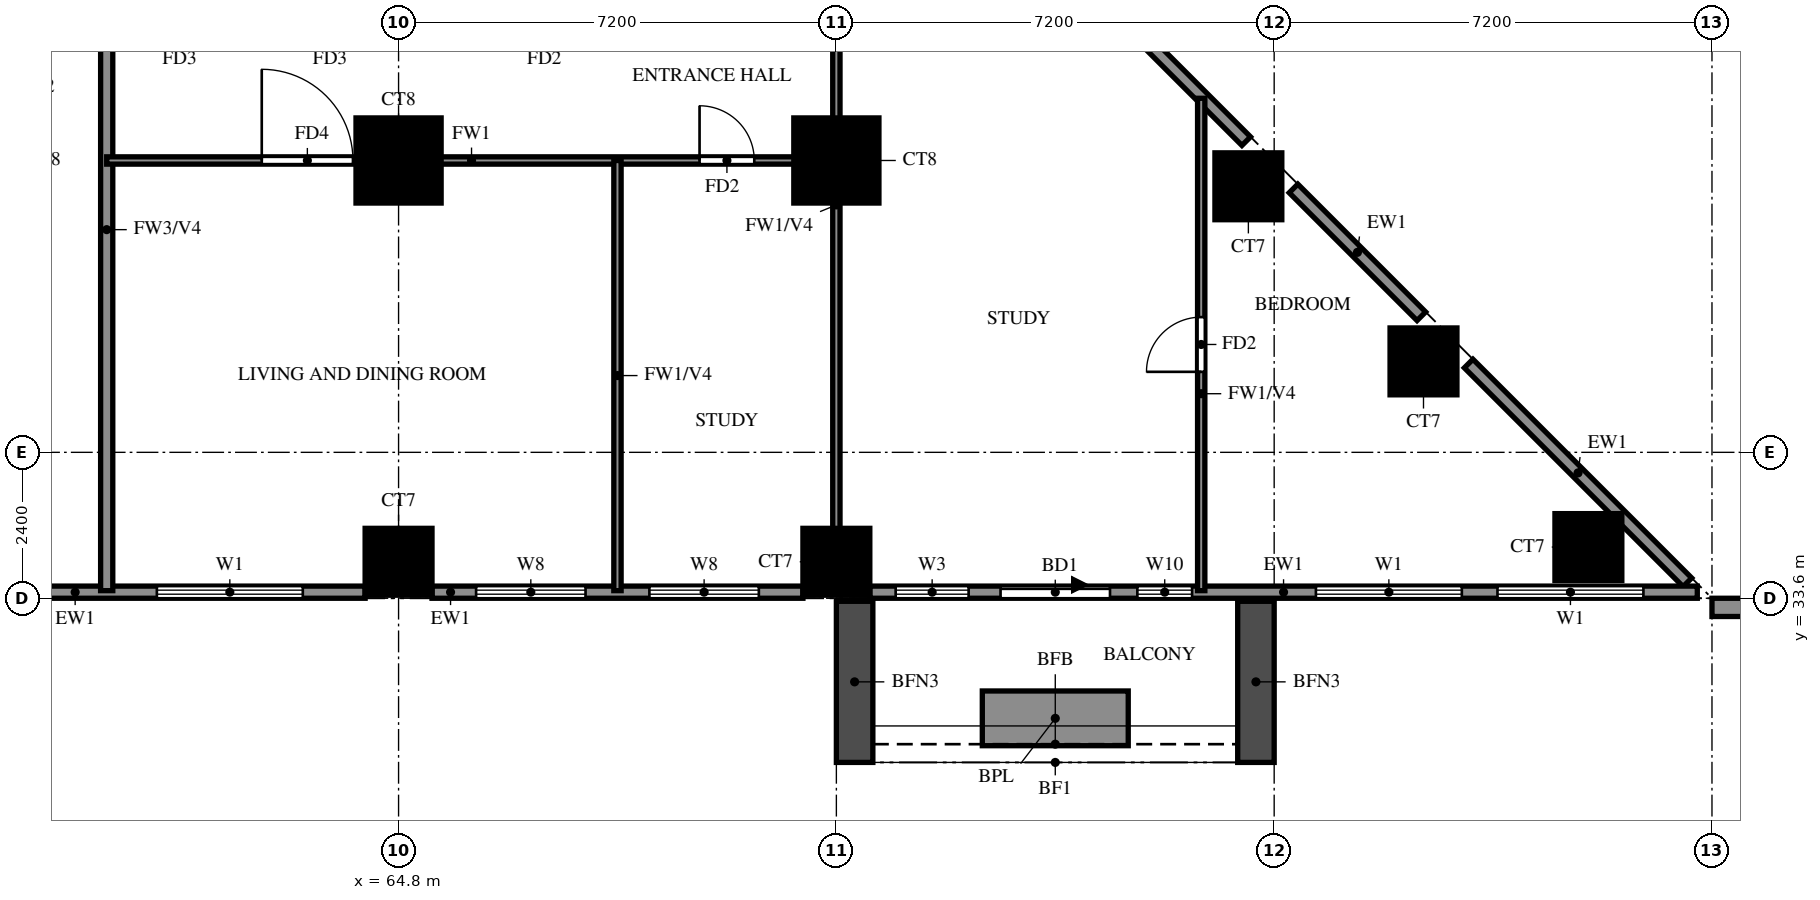
"""IFC4 building model, lengths in metres.
Left out: names, types, materials, properties, quantities, classifications, styles, units other than length and angle.
Written with IfcOpenShell. Run it as: python <this file> out.ifc"""

import sys

from ifc_helpers import new_model, si_unit, direction, frame, frame_2d, origin, origin_2d, place, context, subcontext, project, spatial, rectangle, extrude, source, transform, mapped, element, fill, save


model = new_model("IFC4")
c1 = context("Model", 3, precision=1e-05, world=origin(), true_north=direction((0.0, 1.0)))
c2 = subcontext(c1, "Body", "Model", "MODEL_VIEW")
j1 = project(units=[si_unit("LENGTHUNIT", "METRE"), si_unit("PLANEANGLEUNIT", "RADIAN")], contexts=[c1])
p1 = place(None, origin())
s1 = spatial("IfcSite", under=j1, at=p1, CompositionType="ELEMENT")
p2 = place(p1, origin())
s2 = spatial("IfcBuilding", under=s1, at=p2, CompositionType="ELEMENT")
p3 = place(p2, frame((0.0, 0.0, 55.0)))
s3 = spatial("IfcBuildingStorey", under=s2, at=p3, CompositionType="ELEMENT", Elevation=55.0)
m1 = source(origin(), c2, "Body", "SweptSolid", [
    extrude(rectangle(XDim=1.1, YDim=1.1, at=origin_2d()), origin(), (0.0, 0.0, 1.0), 3.18),
])
for number, where, z_axis, x_axis in (
    (1, (64.8, 34.2, 0.0), (0.0, 0.0, 1.0), (1.0, 0.0, 0.0)),
    (2, (72.0, 34.2, 0.0), (0.0, 0.0, 1.0), (1.0, 0.0, 0.0)),
    (3, (84.367, 34.442, 0.0), (0.0, 0.0, 1.0), (1.0, 0.0, 0.0)),
    (4, (81.656, 37.496, 0.0), (0.0, 0.0, 1.0), (1.0, 0.0, 0.0)),
    (5, (78.776, 40.376, 0.0), (0.0, 0.0, 1.0), (1.0, 0.0, 0.0)),
):
    element("IfcColumn", number, at=place(p3, frame(where, z_axis=z_axis, x_axis=x_axis)), inside=s3, PredefinedType="COLUMN", context=c2, shape_type="MappedRepresentation", body=[
        mapped(m1, transform((0.0, 0.0, 0.0))),
    ])
m2 = source(origin(), c2, "Body", "SweptSolid", [
    extrude(rectangle(XDim=1.4, YDim=1.4, at=origin_2d()), origin(), (0.0, 0.0, 1.0), 3.18),
])
for number, where, z_axis, x_axis in (
    (6, (64.8, 40.8, 0.0), (0.0, 0.0, 1.0), (1.0, 0.0, 0.0)),
    (7, (72.0, 40.8, 0.0), (0.0, 0.0, 1.0), (1.0, 0.0, 0.0)),
):
    element("IfcColumn", number, at=place(p3, frame(where, z_axis=z_axis, x_axis=x_axis)), inside=s3, PredefinedType="COLUMN", context=c2, shape_type="MappedRepresentation", body=[
        mapped(m2, transform((0.0, 0.0, 0.0))),
    ])
p4 = place(p3, frame((85.996, 33.863, 0.0), z_axis=(0.0, 0.0, 1.0), x_axis=(-0.7070827891, 0.707130772459, 0.0)))
e8 = element("IfcWall", 8, at=p4, inside=s3, PredefinedType="SOLIDWALL", context=c2, shape_type="SweptSolid", body=[
    extrude(rectangle(XDim=5.088, YDim=0.2, at=frame_2d((2.544, 0.0))), origin(), (0.0, 0.0, 1.0), 3.18),
])
p5 = place(p3, frame((81.62, 38.238, 0.0), z_axis=(0.0, 0.0, 1.0), x_axis=(-0.707106781187, 0.707106781187, 0.0)))
e9 = element("IfcWall", 9, at=p5, inside=s3, PredefinedType="SOLIDWALL", context=c2, shape_type="SweptSolid", body=[
    extrude(rectangle(XDim=2.973, YDim=0.2, at=frame_2d((1.486, 0.0))), origin(), (0.0, 0.0, 1.0), 3.18),
])
p6 = place(p3, frame((78.74, 41.118, 0.0), z_axis=(0.0, 0.0, 1.0), x_axis=(-0.707106781187, 0.707106781187, 0.0)))
e10 = element("IfcWall", 10, at=p6, inside=s3, PredefinedType="SOLIDWALL", context=c2, shape_type="SweptSolid", body=[
    extrude(rectangle(XDim=9.874, YDim=0.2, at=frame_2d((4.937, 0.0))), origin(), (0.0, 0.0, 1.0), 3.18),
])
p7 = place(p6, frame((2.264, 0.0, 0.6)))
e11 = element("IfcOpeningElement", 11, at=p7, cuts=e10, PredefinedType="OPENING", context=c2, shape_type="SweptSolid", body=[
    extrude(rectangle(XDim=2.4, YDim=2.4, at=frame_2d((1.2, 1.2))), frame((0.0, 0.11, 0.0), z_axis=(0.0, -1.0, 0.0), x_axis=(1.0, 0.0, 0.0)), (0.0, 0.0, 1.0), 0.22),
])
p8 = place(p6, frame((5.836, 0.0, 0.6)))
e12 = element("IfcOpeningElement", 12, at=p8, cuts=e10, PredefinedType="OPENING", context=c2, shape_type="SweptSolid", body=[
    extrude(rectangle(XDim=2.4, YDim=2.4, at=frame_2d((1.2, 1.2))), frame((0.0, 0.11, 0.0), z_axis=(0.0, -1.0, 0.0), x_axis=(1.0, 0.0, 0.0)), (0.0, 0.0, 1.0), 0.22),
])
p9 = place(p3, frame((58.8, 33.7, 0.0), z_axis=(0.0, 0.0, 1.0), x_axis=(1.0, 0.0, 0.0)))
e13 = element("IfcWall", 13, at=p9, inside=s3, PredefinedType="SOLIDWALL", context=c2, shape_type="SweptSolid", body=[
    extrude(rectangle(XDim=5.45, YDim=0.2, at=frame_2d((2.725, 0.0))), origin(), (0.0, 0.0, 1.0), 3.18),
])
p10 = place(p9, frame((2.025, 0.0, 0.6)))
e14 = element("IfcOpeningElement", 14, at=p10, cuts=e13, PredefinedType="OPENING", context=c2, shape_type="SweptSolid", body=[
    extrude(rectangle(XDim=2.4, YDim=2.4, at=frame_2d((1.2, 1.2))), frame((0.0, 0.11, 0.0), z_axis=(0.0, -1.0, 0.0), x_axis=(1.0, 0.0, 0.0)), (0.0, 0.0, 1.0), 0.22),
])
p11 = place(p3, frame((65.35, 33.7, 0.0), z_axis=(0.0, 0.0, 1.0), x_axis=(1.0, 0.0, 0.0)))
e15 = element("IfcWall", 15, at=p11, inside=s3, PredefinedType="SOLIDWALL", context=c2, shape_type="SweptSolid", body=[
    extrude(rectangle(XDim=6.1, YDim=0.2, at=frame_2d((3.05, 0.0))), origin(), (0.0, 0.0, 1.0), 3.18),
])
p12 = place(p11, frame((3.575, 0.0, 0.6)))
e16 = element("IfcOpeningElement", 16, at=p12, cuts=e15, PredefinedType="OPENING", context=c2, shape_type="SweptSolid", body=[
    extrude(rectangle(XDim=1.8, YDim=2.4, at=frame_2d((0.9, 1.2))), frame((0.0, 0.11, 0.0), z_axis=(0.0, -1.0, 0.0), x_axis=(1.0, 0.0, 0.0)), (0.0, 0.0, 1.0), 0.22),
])
p13 = place(p11, frame((0.725, 0.0, 0.6)))
e17 = element("IfcOpeningElement", 17, at=p13, cuts=e15, PredefinedType="OPENING", context=c2, shape_type="SweptSolid", body=[
    extrude(rectangle(XDim=1.8, YDim=2.4, at=frame_2d((0.9, 1.2))), frame((0.0, 0.11, 0.0), z_axis=(0.0, -1.0, 0.0), x_axis=(1.0, 0.0, 0.0)), (0.0, 0.0, 1.0), 0.22),
])
p14 = place(p3, frame((72.55, 33.7, 0.0), z_axis=(0.0, 0.0, 1.0), x_axis=(1.0, 0.0, 0.0)))
e18 = element("IfcWall", 18, at=p14, inside=s3, PredefinedType="SOLIDWALL", context=c2, shape_type="SweptSolid", body=[
    extrude(rectangle(XDim=13.609, YDim=0.2, at=frame_2d((6.804, 0.0))), origin(), (0.0, 0.0, 1.0), 3.18),
])
p15 = place(p14, frame((2.15, 0.0, 0.0)))
e19 = element("IfcOpeningElement", 19, at=p15, cuts=e18, PredefinedType="OPENING", context=c2, shape_type="SweptSolid", body=[
    extrude(rectangle(XDim=1.8, YDim=2.4, at=frame_2d((0.9, 1.2))), frame((0.0, 0.11, 0.0), z_axis=(0.0, -1.0, 0.0), x_axis=(1.0, 0.0, 0.0)), (0.0, 0.0, 1.0), 0.22),
])
p16 = place(p14, frame((0.425, 0.0, 0.6)))
e20 = element("IfcOpeningElement", 20, at=p16, cuts=e18, PredefinedType="OPENING", context=c2, shape_type="SweptSolid", body=[
    extrude(rectangle(XDim=1.2, YDim=2.4, at=frame_2d((0.6, 1.2))), frame((0.0, 0.11, 0.0), z_axis=(0.0, -1.0, 0.0), x_axis=(1.0, 0.0, 0.0)), (0.0, 0.0, 1.0), 0.22),
])
p17 = place(p14, frame((4.4, 0.0, 0.6)))
e21 = element("IfcOpeningElement", 21, at=p17, cuts=e18, PredefinedType="OPENING", context=c2, shape_type="SweptSolid", body=[
    extrude(rectangle(XDim=0.9, YDim=2.4, at=frame_2d((0.45, 1.2))), frame((0.0, 0.11, 0.0), z_axis=(0.0, -1.0, 0.0), x_axis=(1.0, 0.0, 0.0)), (0.0, 0.0, 1.0), 0.22),
])
p18 = place(p14, frame((7.336, 0.0, 0.6)))
e22 = element("IfcOpeningElement", 22, at=p18, cuts=e18, PredefinedType="OPENING", context=c2, shape_type="SweptSolid", body=[
    extrude(rectangle(XDim=2.4, YDim=2.4, at=frame_2d((1.2, 1.2))), frame((0.0, 0.11, 0.0), z_axis=(0.0, -1.0, 0.0), x_axis=(1.0, 0.0, 0.0)), (0.0, 0.0, 1.0), 0.22),
])
p19 = place(p14, frame((10.323, 0.0, 0.6)))
e23 = element("IfcOpeningElement", 23, at=p19, cuts=e18, PredefinedType="OPENING", context=c2, shape_type="SweptSolid", body=[
    extrude(rectangle(XDim=2.4, YDim=2.4, at=frame_2d((1.2, 1.2))), frame((0.0, 0.11, 0.0), z_axis=(0.0, -1.0, 0.0), x_axis=(1.0, 0.0, 0.0)), (0.0, 0.0, 1.0), 0.22),
])
p20 = place(p3, frame((86.4, 33.45, -0.32), z_axis=(0.0, 0.0, 1.0), x_axis=(1.0, 0.0, 0.0)))
e24 = element("IfcWall", 24, at=p20, inside=s3, PredefinedType="SOLIDWALL", context=c2, shape_type="SweptSolid", body=[
    extrude(rectangle(XDim=2.4, YDim=0.3, at=frame_2d((1.2, 0.0))), origin(), (0.0, 0.0, 1.0), 3.5),
])
for number, where, z_axis, x_axis in (
    (25, (72.3, 33.55, 0.0), (0.0, 0.0, 1.0), (0.0, -1.0, 0.0)),
    (26, (78.9, 33.55, 0.0), (0.0, 0.0, 1.0), (0.0, -1.0, 0.0)),
):
    element("IfcWall", number, at=place(p3, frame(where, z_axis=z_axis, x_axis=x_axis)), inside=s3, PredefinedType="SOLIDWALL", context=c2, shape_type="SweptSolid", body=[
        extrude(rectangle(XDim=2.65, YDim=0.6, at=frame_2d((1.325, 0.0))), origin(), (0.0, 0.0, 1.0), 2.85),
    ])
p21 = place(p3, frame((74.4, 31.625, 0.0), z_axis=(0.0, 0.0, 1.0), x_axis=(1.0, 0.0, 0.0)))
e27 = element("IfcWall", 27, at=p21, inside=s3, PredefinedType="SOLIDWALL", context=c2, shape_type="SweptSolid", body=[
    extrude(rectangle(XDim=2.4, YDim=0.9, at=frame_2d((1.2, 0.0))), origin(), (0.0, 0.0, 1.0), 0.9),
])
p22 = place(p3, frame((60.0, 33.725, 0.0), z_axis=(0.0, 0.0, 1.0), x_axis=(0.0, 1.0, 0.0)))
e28 = element("IfcWall", 28, at=p22, inside=s3, PredefinedType="SOLIDWALL", context=c2, shape_type="SweptSolid", body=[
    extrude(rectangle(XDim=11.875, YDim=0.2, at=frame_2d((5.938, 0.0))), origin(), (0.0, 0.0, 1.0), 2.28),
])
p23 = place(p3, frame((60.0, 40.8, 0.0), z_axis=(0.0, 0.0, 1.0), x_axis=(1.0, 0.0, 0.0)))
e29 = element("IfcWall", 29, at=p23, inside=s3, PredefinedType="PARTITIONING", context=c2, shape_type="SweptSolid", body=[
    extrude(rectangle(XDim=12.0, YDim=0.12, at=frame_2d((6.0, 0.0))), origin(), (0.0, 0.0, 1.0), 3.18),
])
p24 = place(p23, frame((9.75, 0.0, 0.0)))
e30 = element("IfcOpeningElement", 30, at=p24, cuts=e29, PredefinedType="OPENING", context=c2, shape_type="SweptSolid", body=[
    extrude(rectangle(XDim=0.9, YDim=2.1, at=frame_2d((0.45, 1.05))), frame((0.0, 0.07, 0.0), z_axis=(0.0, -1.0, 0.0), x_axis=(1.0, 0.0, 0.0)), (0.0, 0.0, 1.0), 0.14),
])
p25 = place(p23, frame((2.55, 0.0, 0.0)))
e31 = element("IfcOpeningElement", 31, at=p25, cuts=e29, PredefinedType="OPENING", context=c2, shape_type="SweptSolid", body=[
    extrude(rectangle(XDim=1.5, YDim=2.1, at=frame_2d((0.75, 1.05))), frame((0.0, 0.07, 0.0), z_axis=(0.0, -1.0, 0.0), x_axis=(1.0, 0.0, 0.0)), (0.0, 0.0, 1.0), 0.14),
])
p26 = place(p3, frame((68.4, 33.725, 0.0), z_axis=(0.0, 0.0, 1.0), x_axis=(0.0, 1.0, 0.0)))
e32 = element("IfcWall", 32, at=p26, inside=s3, PredefinedType="PARTITIONING", context=c2, shape_type="SweptSolid", body=[
    extrude(rectangle(XDim=7.075, YDim=0.12, at=frame_2d((3.538, 0.0))), origin(), (0.0, 0.0, 1.0), 2.28),
])
p27 = place(p3, frame((72.0, 33.725, 0.0), z_axis=(0.0, 0.0, 1.0), x_axis=(0.0, 1.0, 0.0)))
e33 = element("IfcWall", 33, at=p27, inside=s3, PredefinedType="PARTITIONING", context=c2, shape_type="SweptSolid", body=[
    extrude(rectangle(XDim=14.098, YDim=0.12, at=frame_2d((7.049, 0.0))), origin(), (0.0, 0.0, 1.0), 2.28),
])
p28 = place(p27, frame((10.075, 0.0, 0.0)))
e34 = element("IfcOpeningElement", 34, at=p28, cuts=e33, PredefinedType="OPENING", context=c2, shape_type="SweptSolid", body=[
    extrude(rectangle(XDim=0.9, YDim=2.1, at=frame_2d((0.45, 1.05))), frame((0.0, 0.07, 0.0), z_axis=(0.0, -1.0, 0.0), x_axis=(1.0, 0.0, 0.0)), (0.0, 0.0, 1.0), 0.14),
])
p29 = place(p3, frame((78.0, 33.725, 0.0), z_axis=(0.0, 0.0, 1.0), x_axis=(0.0, 1.0, 0.0)))
e35 = element("IfcWall", 35, at=p29, inside=s3, PredefinedType="PARTITIONING", context=c2, shape_type="SweptSolid", body=[
    extrude(rectangle(XDim=8.098, YDim=0.12, at=frame_2d((4.049, 0.0))), origin(), (0.0, 0.0, 1.0), 2.28),
])
p30 = place(p29, frame((3.599, 0.0, 0.0)))
e36 = element("IfcOpeningElement", 36, at=p30, cuts=e35, PredefinedType="OPENING", context=c2, shape_type="SweptSolid", body=[
    extrude(rectangle(XDim=0.9, YDim=2.1, at=frame_2d((0.45, 1.05))), frame((0.0, 0.07, 0.0), z_axis=(0.0, -1.0, 0.0), x_axis=(1.0, 0.0, 0.0)), (0.0, 0.0, 1.0), 0.14),
])
p31 = place(p10, origin())
e37 = element("IfcWindow", 37, at=p31, inside=s3, PartitioningType="DOUBLE_PANEL_VERTICAL", PredefinedType="WINDOW", context=c2, shape_type="SweptSolid", body=[
    extrude(rectangle(XDim=2.4, YDim=2.4, at=frame_2d((1.2, 1.2))), frame((0.0, 0.03, 0.0), z_axis=(0.0, -1.0, 0.0), x_axis=(1.0, 0.0, 0.0)), (0.0, 0.0, 1.0), 0.06),
])
fill(e14, e37)
p32 = place(p12, origin())
e38 = element("IfcWindow", 38, at=p32, inside=s3, PartitioningType="DOUBLE_PANEL_VERTICAL", PredefinedType="WINDOW", context=c2, shape_type="SweptSolid", body=[
    extrude(rectangle(XDim=1.8, YDim=2.4, at=frame_2d((0.9, 1.2))), frame((0.0, 0.03, 0.0), z_axis=(0.0, -1.0, 0.0), x_axis=(1.0, 0.0, 0.0)), (0.0, 0.0, 1.0), 0.06),
])
fill(e16, e38)
p33 = place(p13, origin())
e39 = element("IfcWindow", 39, at=p33, inside=s3, PartitioningType="DOUBLE_PANEL_VERTICAL", PredefinedType="WINDOW", context=c2, shape_type="SweptSolid", body=[
    extrude(rectangle(XDim=1.8, YDim=2.4, at=frame_2d((0.9, 1.2))), frame((0.0, 0.03, 0.0), z_axis=(0.0, -1.0, 0.0), x_axis=(1.0, 0.0, 0.0)), (0.0, 0.0, 1.0), 0.06),
])
fill(e17, e39)
p34 = place(p15, origin())
e40 = element("IfcDoor", 40, at=p34, inside=s3, OperationType="DOUBLE_DOOR_SLIDING", PredefinedType="DOOR", context=c2, shape_type="SweptSolid", body=[
    extrude(rectangle(XDim=1.8, YDim=2.4, at=frame_2d((0.9, 1.2))), frame((0.0, 0.025, 0.0), z_axis=(0.0, -1.0, 0.0), x_axis=(1.0, 0.0, 0.0)), (0.0, 0.0, 1.0), 0.05),
])
fill(e19, e40)
p35 = place(p16, origin())
e41 = element("IfcWindow", 41, at=p35, inside=s3, PartitioningType="SINGLE_PANEL", PredefinedType="WINDOW", context=c2, shape_type="SweptSolid", body=[
    extrude(rectangle(XDim=1.2, YDim=2.4, at=frame_2d((0.6, 1.2))), frame((0.0, 0.03, 0.0), z_axis=(0.0, -1.0, 0.0), x_axis=(1.0, 0.0, 0.0)), (0.0, 0.0, 1.0), 0.06),
])
fill(e20, e41)
p36 = place(p17, origin())
e42 = element("IfcWindow", 42, at=p36, inside=s3, PartitioningType="SINGLE_PANEL", PredefinedType="WINDOW", context=c2, shape_type="SweptSolid", body=[
    extrude(rectangle(XDim=0.9, YDim=2.4, at=frame_2d((0.45, 1.2))), frame((0.0, 0.03, 0.0), z_axis=(0.0, -1.0, 0.0), x_axis=(1.0, 0.0, 0.0)), (0.0, 0.0, 1.0), 0.06),
])
fill(e21, e42)
p37 = place(p18, origin())
e43 = element("IfcWindow", 43, at=p37, inside=s3, PartitioningType="DOUBLE_PANEL_VERTICAL", PredefinedType="WINDOW", context=c2, shape_type="SweptSolid", body=[
    extrude(rectangle(XDim=2.4, YDim=2.4, at=frame_2d((1.2, 1.2))), frame((0.0, 0.03, 0.0), z_axis=(0.0, -1.0, 0.0), x_axis=(1.0, 0.0, 0.0)), (0.0, 0.0, 1.0), 0.06),
])
fill(e22, e43)
p38 = place(p19, origin())
e44 = element("IfcWindow", 44, at=p38, inside=s3, PartitioningType="DOUBLE_PANEL_VERTICAL", PredefinedType="WINDOW", context=c2, shape_type="SweptSolid", body=[
    extrude(rectangle(XDim=2.4, YDim=2.4, at=frame_2d((1.2, 1.2))), frame((0.0, 0.03, 0.0), z_axis=(0.0, -1.0, 0.0), x_axis=(1.0, 0.0, 0.0)), (0.0, 0.0, 1.0), 0.06),
])
fill(e23, e44)
p39 = place(p24, origin())
e45 = element("IfcDoor", 45, at=p39, inside=s3, OperationType="SINGLE_SWING_LEFT", PredefinedType="DOOR", context=c2, shape_type="SweptSolid", body=[
    extrude(rectangle(XDim=0.9, YDim=2.1, at=frame_2d((0.45, 1.05))), frame((0.0, 0.025, 0.0), z_axis=(0.0, -1.0, 0.0), x_axis=(1.0, 0.0, 0.0)), (0.0, 0.0, 1.0), 0.05),
])
fill(e30, e45)
p40 = place(p25, origin())
e46 = element("IfcDoor", 46, at=p40, inside=s3, OperationType="SINGLE_SWING_RIGHT", PredefinedType="DOOR", context=c2, shape_type="SweptSolid", body=[
    extrude(rectangle(XDim=1.5, YDim=2.1, at=frame_2d((0.75, 1.05))), frame((0.0, 0.025, 0.0), z_axis=(0.0, -1.0, 0.0), x_axis=(1.0, 0.0, 0.0)), (0.0, 0.0, 1.0), 0.05),
])
fill(e31, e46)
p41 = place(p30, origin())
e47 = element("IfcDoor", 47, at=p41, inside=s3, OperationType="SINGLE_SWING_LEFT", PredefinedType="DOOR", context=c2, shape_type="SweptSolid", body=[
    extrude(rectangle(XDim=0.9, YDim=2.1, at=frame_2d((0.45, 1.05))), frame((0.0, 0.025, 0.0), z_axis=(0.0, -1.0, 0.0), x_axis=(1.0, 0.0, 0.0)), (0.0, 0.0, 1.0), 0.05),
])
fill(e36, e47)
save(model, sys.argv[1])
